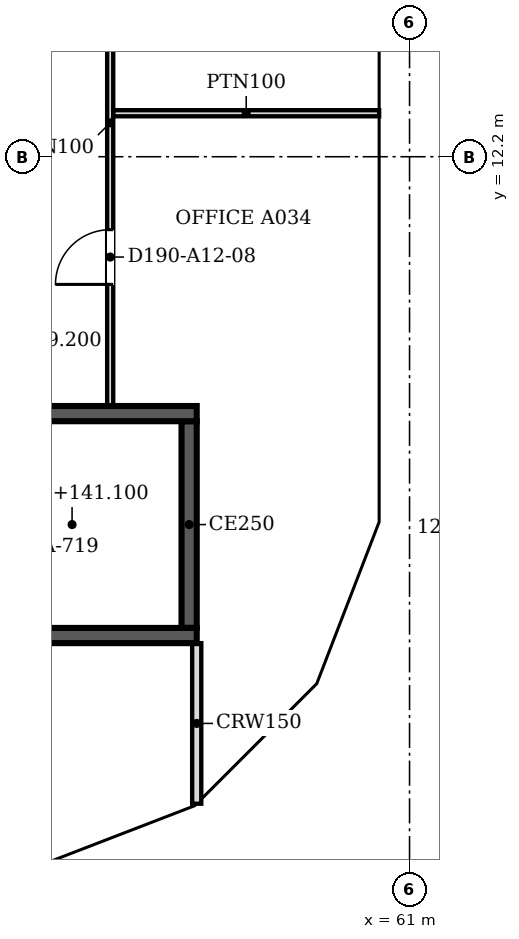
"""IFC4 building model, lengths in metres.
Left out: names, types, materials, properties, quantities, classifications, styles, units other than length and angle.
Written with IfcOpenShell. Run it as: python <this file> out.ifc"""

import sys

from ifc_helpers import new_model, si_unit, direction, frame, frame_2d, origin, place, context, subcontext, project, spatial, polyline, rectangle, outline, extrude, faceted_brep, source, transform, mapped, element, fill, save


model = new_model("IFC4")
c1 = context("Model", 3, precision=1e-05, world=origin(), true_north=direction((0.0, 1.0)))
c2 = subcontext(c1, "Body", "Model", "MODEL_VIEW")
j1 = project(units=[si_unit("LENGTHUNIT", "METRE"), si_unit("PLANEANGLEUNIT", "RADIAN")], contexts=[c1])
p1 = place(None, origin())
s1 = spatial("IfcSite", under=j1, at=p1, CompositionType="ELEMENT")
p2 = place(p1, origin())
s2 = spatial("IfcBuilding", under=s1, at=p2, CompositionType="ELEMENT")
p3 = place(p2, frame((0.0, 0.0, 139.2)))
s3 = spatial("IfcBuildingStorey", under=s2, at=p3, CompositionType="ELEMENT", Elevation=139.2)
m1 = source(origin(), c2, "Body", "Brep", [
    faceted_brep([(2.95, -0.25, 0.0), (3.003, -0.25, 0.068), (3.003, -0.25, 7.532), (2.95, -0.25, 7.6), (0.0, -0.25, 3.8), (0.047, 0.25, 3.86), (2.898, 0.25, 7.532), (2.898, 0.25, 0.068), (0.047, 0.25, 3.74), (2.95, 0.0, 0.0), (2.95, 0.0, 7.6), (0.0, 0.0, 3.8)], [[[0, 1, 2, 3, 4]], [[5, 6, 7, 8]], [[1, 0, 9]], [[10, 3, 2]], [[6, 5, 11, 4, 3, 10]], [[8, 7, 9, 0, 4, 11]], [[8, 11, 5]], [[1, 9, 7, 6, 10, 2]]]),
])
p4 = place(p3, frame((54.854, 0.25, -3.8), z_axis=(0.0, 0.0, 1.0), x_axis=(0.932970071518, 0.359953949349, 0.0)))
e1 = element("IfcWall", 1, at=p4, inside=s3, PredefinedType="SOLIDWALL", context=c2, shape_type="MappedRepresentation", body=[
    mapped(m1, transform((0.0, 0.0, 0.0), scale=1.0)),
])
m2 = source(origin(), c2, "Body", "SweptSolid", [
    extrude(outline(polyline([(2.75, 6.935), (0.316, 3.8), (2.75, 0.665), (2.75, 6.935)])), frame((0.0, 0.26, 0.0), z_axis=(0.0, -1.0, 0.0), x_axis=(1.0, 0.0, 0.0)), (0.0, 0.0, 1.0), 0.52),
])
p5 = place(p4, origin())
e2 = element("IfcOpeningElement", 2, at=p5, cuts=e1, PredefinedType="OPENING", context=c2, shape_type="MappedRepresentation", body=[
    mapped(m2, transform((0.0, 0.0, 0.0), scale=1.0)),
])
m3 = source(origin(), c2, "Body", "Brep", [
    faceted_brep([(0.053, -0.25, 0.0), (2.997, -0.25, 3.8), (0.053, -0.25, 7.6), (0.0, -0.25, 7.532), (0.0, -0.25, 0.068), (0.106, 0.25, 7.532), (2.944, 0.25, 3.868), (2.944, 0.25, 3.732), (0.106, 0.25, 0.068), (2.997, 0.0, 3.8), (0.053, 0.0, 0.0), (0.053, 0.0, 7.6)], [[[0, 1, 2, 3, 4]], [[5, 6, 7, 8]], [[8, 7, 9, 1, 0, 10]], [[6, 5, 11, 2, 1, 9]], [[3, 2, 11]], [[10, 0, 4]], [[8, 10, 4, 3, 11, 5]], [[9, 7, 6]]]),
])
p6 = place(p3, frame((57.569, 1.274, -3.8), z_axis=(0.0, 0.0, 1.0), x_axis=(0.707066050402, 0.707147509625, 0.0)))
e3 = element("IfcWall", 3, at=p6, inside=s3, PredefinedType="SOLIDWALL", context=c2, shape_type="MappedRepresentation", body=[
    mapped(m3, transform((0.0, 0.0, 0.0), scale=1.0)),
])
m4 = source(origin(), c2, "Body", "SweptSolid", [
    extrude(outline(polyline([(0.253, 0.667), (2.681, 3.8), (0.253, 6.934), (0.253, 0.667)])), frame((0.0, 0.26, 0.0), z_axis=(0.0, -1.0, 0.0), x_axis=(1.0, 0.0, 0.0)), (0.0, 0.0, 1.0), 0.52),
])
p7 = place(p6, origin())
e4 = element("IfcOpeningElement", 4, at=p7, cuts=e3, PredefinedType="OPENING", context=c2, shape_type="MappedRepresentation", body=[
    mapped(m4, transform((0.0, 0.0, 0.0), scale=1.0)),
])
m5 = source(origin(), c2, "Body", "Brep", [
    faceted_brep([(2.95, -0.25, 0.0), (2.997, -0.25, 0.059), (2.997, -0.25, 7.541), (2.95, -0.25, 7.6), (0.0, -0.25, 3.8), (0.053, 0.25, 3.868), (2.904, 0.25, 7.54), (2.904, 0.25, 0.06), (0.053, 0.25, 3.732), (2.95, 0.0, 0.0), (2.95, 0.0, 7.6), (0.0, 0.0, 3.8)], [[[0, 1, 2, 3, 4]], [[5, 6, 7, 8]], [[1, 0, 9]], [[10, 3, 2]], [[6, 5, 11, 4, 3, 10]], [[8, 7, 9, 0, 4, 11]], [[8, 11, 5]], [[1, 9, 7, 6, 10, 2]]]),
])
p8 = place(p3, frame((59.688, 3.394, -3.8), z_axis=(0.0, 0.0, 1.0), x_axis=(0.359972353723, 0.932962970624, 0.0)))
e5 = element("IfcWall", 5, at=p8, inside=s3, PredefinedType="SOLIDWALL", context=c2, shape_type="MappedRepresentation", body=[
    mapped(m5, transform((0.0, 0.0, 0.0), scale=1.0)),
])
p9 = place(p8, origin())
e6 = element("IfcOpeningElement", 6, at=p9, cuts=e5, PredefinedType="OPENING", context=c2, shape_type="MappedRepresentation", body=[
    mapped(m2, transform((0.0, 0.0, 0.0), scale=1.0)),
])
m6 = source(origin(), c2, "Body", "Brep", [
    faceted_brep([(0.047, -0.25, 0.0), (3.05, -0.25, 3.8), (0.047, -0.25, 7.6), (0.0, -0.25, 7.54), (0.0, -0.25, 0.06), (0.093, 0.25, 7.541), (3.05, 0.25, 3.8), (0.093, 0.25, 0.059), (0.047, 0.0, 0.0), (0.047, 0.0, 7.6)], [[[0, 1, 2, 3, 4]], [[5, 6, 7]], [[7, 6, 1, 0, 8]], [[6, 5, 9, 2, 1]], [[3, 2, 9]], [[8, 0, 4]], [[7, 8, 4, 3, 9, 5]]]),
])
p10 = place(p3, frame((60.75, 6.1, -3.8), z_axis=(0.0, 0.0, 1.0), x_axis=(0.0, 1.0, 0.0)))
e7 = element("IfcWall", 7, at=p10, inside=s3, PredefinedType="SOLIDWALL", context=c2, shape_type="MappedRepresentation", body=[
    mapped(m6, transform((0.0, 0.0, 0.0), scale=1.0)),
])
m7 = source(origin(), c2, "Body", "SweptSolid", [
    extrude(outline(polyline([(0.247, 0.656), (2.731, 3.8), (0.247, 6.944), (0.247, 0.656)])), frame((0.0, 0.26, 0.0), z_axis=(0.0, -1.0, 0.0), x_axis=(1.0, 0.0, 0.0)), (0.0, 0.0, 1.0), 0.52),
])
p11 = place(p10, origin())
e8 = element("IfcOpeningElement", 8, at=p11, cuts=e7, PredefinedType="OPENING", context=c2, shape_type="MappedRepresentation", body=[
    mapped(m7, transform((0.0, 0.0, 0.0), scale=1.0)),
])
m8 = source(origin(), c2, "Body", "SweptSolid", [
    extrude(outline(polyline([(3.05, 0.0), (6.1, 3.8), (3.05, 7.6), (0.0, 3.8), (3.05, 0.0)])), frame((0.0, 0.25, 0.0), z_axis=(0.0, -1.0, 0.0), x_axis=(1.0, 0.0, 0.0)), (0.0, 0.0, 1.0), 0.5),
])
p12 = place(p3, frame((60.75, 9.15, -3.8), z_axis=(0.0, 0.0, 1.0), x_axis=(0.0, 1.0, 0.0)))
e9 = element("IfcWall", 9, at=p12, inside=s3, PredefinedType="SOLIDWALL", context=c2, shape_type="MappedRepresentation", body=[
    mapped(m8, transform((0.0, 0.0, 0.0), scale=1.0)),
])
m9 = source(origin(), c2, "Body", "SweptSolid", [
    extrude(outline(polyline([(3.05, 0.399), (5.78, 3.8), (3.05, 7.201), (0.321, 3.8), (3.05, 0.399)])), frame((0.0, 0.26, 0.0), z_axis=(0.0, -1.0, 0.0), x_axis=(1.0, 0.0, 0.0)), (0.0, 0.0, 1.0), 0.52),
])
p13 = place(p12, origin())
e10 = element("IfcOpeningElement", 10, at=p13, cuts=e9, PredefinedType="OPENING", context=c2, shape_type="MappedRepresentation", body=[
    mapped(m9, transform((0.0, 0.0, 0.0), scale=1.0)),
])
p14 = place(p2, frame((0.0, 0.0, 143.0)))
s4 = spatial("IfcBuildingStorey", under=s2, at=p14, CompositionType="ELEMENT", Elevation=143.0)
m10 = source(origin(), c2, "Body", "Brep", [
    faceted_brep([(0.047, -0.25, 0.0), (2.997, -0.25, 3.8), (0.047, -0.25, 7.6), (0.0, -0.25, 7.541), (0.0, -0.25, 0.059), (0.093, 0.25, 7.54), (2.944, 0.25, 3.868), (2.944, 0.25, 3.732), (0.093, 0.25, 0.06), (2.997, 0.0, 3.8), (0.047, 0.0, 0.0), (0.047, 0.0, 7.6)], [[[0, 1, 2, 3, 4]], [[5, 6, 7, 8]], [[8, 7, 9, 1, 0, 10]], [[6, 5, 11, 2, 1, 9]], [[3, 2, 11]], [[10, 0, 4]], [[8, 10, 4, 3, 11, 5]], [[9, 7, 6]]]),
])
p15 = place(p14, frame((54.81, 0.233, -3.8), z_axis=(0.0, 0.0, 1.0), x_axis=(0.932990326376, 0.359901446078, 0.0)))
e11 = element("IfcWall", 11, at=p15, inside=s4, PredefinedType="SOLIDWALL", context=c2, shape_type="MappedRepresentation", body=[
    mapped(m10, transform((0.0, 0.0, 0.0), scale=1.0)),
])
m11 = source(origin(), c2, "Body", "SweptSolid", [
    extrude(outline(polyline([(0.247, 0.665), (2.681, 3.8), (0.247, 6.935), (0.247, 0.665)])), frame((0.0, 0.26, 0.0), z_axis=(0.0, -1.0, 0.0), x_axis=(1.0, 0.0, 0.0)), (0.0, 0.0, 1.0), 0.52),
])
p16 = place(p15, origin())
e12 = element("IfcOpeningElement", 12, at=p16, cuts=e11, PredefinedType="OPENING", context=c2, shape_type="MappedRepresentation", body=[
    mapped(m11, transform((0.0, 0.0, 0.0), scale=1.0)),
])
m12 = source(origin(), c2, "Body", "Brep", [
    faceted_brep([(2.944, -0.25, 0.0), (2.997, -0.25, 0.068), (2.997, -0.25, 7.532), (2.944, -0.25, 7.6), (0.0, -0.25, 3.8), (0.053, 0.25, 3.868), (2.891, 0.25, 7.532), (2.891, 0.25, 0.068), (0.053, 0.25, 3.732), (2.944, 0.0, 0.0), (2.944, 0.0, 7.6), (0.0, 0.0, 3.8)], [[[0, 1, 2, 3, 4]], [[5, 6, 7, 8]], [[1, 0, 9]], [[10, 3, 2]], [[6, 5, 11, 4, 3, 10]], [[8, 7, 9, 0, 4, 11]], [[8, 11, 5]], [[1, 9, 7, 6, 10, 2]]]),
])
p17 = place(p14, frame((57.606, 1.312, -3.8), z_axis=(0.0, 0.0, 1.0), x_axis=(0.707147509625, 0.707066050402, 0.0)))
e13 = element("IfcWall", 13, at=p17, inside=s4, PredefinedType="SOLIDWALL", context=c2, shape_type="MappedRepresentation", body=[
    mapped(m12, transform((0.0, 0.0, 0.0), scale=1.0)),
])
m13 = source(origin(), c2, "Body", "SweptSolid", [
    extrude(outline(polyline([(2.744, 6.934), (0.316, 3.8), (2.744, 0.666), (2.744, 6.934)])), frame((0.0, 0.26, 0.0), z_axis=(0.0, -1.0, 0.0), x_axis=(1.0, 0.0, 0.0)), (0.0, 0.0, 1.0), 0.52),
])
p18 = place(p17, origin())
e14 = element("IfcOpeningElement", 14, at=p18, cuts=e13, PredefinedType="OPENING", context=c2, shape_type="MappedRepresentation", body=[
    mapped(m13, transform((0.0, 0.0, 0.0), scale=1.0)),
])
m14 = source(origin(), c2, "Body", "Brep", [
    faceted_brep([(0.053, -0.25, 0.0), (3.003, -0.25, 3.8), (0.053, -0.25, 7.6), (0.0, -0.25, 7.532), (0.0, -0.25, 0.068), (0.106, 0.25, 7.532), (2.957, 0.25, 3.86), (2.957, 0.25, 3.74), (0.106, 0.25, 0.068), (3.003, 0.0, 3.8), (0.053, 0.0, 0.0), (0.053, 0.0, 7.6)], [[[0, 1, 2, 3, 4]], [[5, 6, 7, 8]], [[8, 7, 9, 1, 0, 10]], [[6, 5, 11, 2, 1, 9]], [[3, 2, 11]], [[10, 0, 4]], [[8, 10, 4, 3, 11, 5]], [[9, 7, 6]]]),
])
p19 = place(p14, frame((59.669, 3.344, -3.8), z_axis=(0.0, 0.0, 1.0), x_axis=(0.35992665181, 0.932980602862, 0.0)))
e15 = element("IfcWall", 15, at=p19, inside=s4, PredefinedType="SOLIDWALL", context=c2, shape_type="MappedRepresentation", body=[
    mapped(m14, transform((0.0, 0.0, 0.0), scale=1.0)),
])
m15 = source(origin(), c2, "Body", "SweptSolid", [
    extrude(outline(polyline([(0.253, 0.665), (2.687, 3.8), (0.253, 6.935), (0.253, 0.665)])), frame((0.0, 0.26, 0.0), z_axis=(0.0, -1.0, 0.0), x_axis=(1.0, 0.0, 0.0)), (0.0, 0.0, 1.0), 0.52),
])
p20 = place(p19, origin())
e16 = element("IfcOpeningElement", 16, at=p20, cuts=e15, PredefinedType="OPENING", context=c2, shape_type="MappedRepresentation", body=[
    mapped(m15, transform((0.0, 0.0, 0.0), scale=1.0)),
])
m16 = source(origin(), c2, "Body", "Brep", [
    faceted_brep([(3.003, -0.25, 0.0), (6.053, -0.25, 3.8), (3.003, -0.25, 7.6), (0.0, -0.25, 3.8), (0.047, 0.25, 3.859), (3.003, 0.25, 7.6), (6.053, 0.25, 3.8), (3.003, 0.25, 0.0), (0.047, 0.25, 3.741), (0.0, 0.0, 3.8)], [[[0, 1, 2, 3]], [[4, 5, 6, 7, 8]], [[7, 6, 1, 0]], [[6, 5, 2, 1]], [[5, 4, 9, 3, 2]], [[8, 7, 0, 3, 9]], [[8, 9, 4]]]),
])
p21 = place(p14, frame((60.75, 6.146, -3.8), z_axis=(0.0, 0.0, 1.0), x_axis=(0.0, 1.0, 0.0)))
e17 = element("IfcWall", 17, at=p21, inside=s4, PredefinedType="SOLIDWALL", context=c2, shape_type="MappedRepresentation", body=[
    mapped(m16, transform((0.0, 0.0, 0.0), scale=1.0)),
])
m17 = source(origin(), c2, "Body", "SweptSolid", [
    extrude(outline(polyline([(3.005, 0.401), (5.733, 3.8), (3.005, 7.199), (0.319, 3.8), (3.005, 0.401)])), frame((0.0, 0.26, 0.0), z_axis=(0.0, -1.0, 0.0), x_axis=(1.0, 0.0, 0.0)), (0.0, 0.0, 1.0), 0.52),
])
p22 = place(p21, origin())
e18 = element("IfcOpeningElement", 18, at=p22, cuts=e17, PredefinedType="OPENING", context=c2, shape_type="MappedRepresentation", body=[
    mapped(m17, transform((0.0, 0.0, 0.0), scale=1.0)),
])
p23 = place(p14, frame((60.75, 12.2, -3.8), z_axis=(0.0, 0.0, 1.0), x_axis=(0.0, 1.0, 0.0)))
e19 = element("IfcWall", 19, at=p23, inside=s4, PredefinedType="SOLIDWALL", context=c2, shape_type="MappedRepresentation", body=[
    mapped(m8, transform((0.0, 0.0, 0.0), scale=1.0)),
])
p24 = place(p23, origin())
e20 = element("IfcOpeningElement", 20, at=p24, cuts=e19, PredefinedType="OPENING", context=c2, shape_type="MappedRepresentation", body=[
    mapped(m9, transform((0.0, 0.0, 0.0), scale=1.0)),
])
p25 = place(p3, frame((57.5, 4.325, 0.0), z_axis=(0.0, 0.0, 1.0), x_axis=(-1.0, 0.0, 0.0)))
e21 = element("IfcWall", 21, at=p25, inside=s3, PredefinedType="SOLIDWALL", context=c2, shape_type="SweptSolid", body=[
    extrude(rectangle(XDim=8.5, YDim=0.25, at=frame_2d((4.25, 0.0))), origin(), (0.0, 0.0, 1.0), 3.8),
])
m18 = source(origin(), c2, "Body", "SweptSolid", [
    extrude(rectangle(XDim=1.2, YDim=2.1, at=frame_2d((0.6, 1.05))), frame((0.0, 0.135, 0.0), z_axis=(0.0, -1.0, 0.0), x_axis=(1.0, 0.0, 0.0)), (0.0, 0.0, 1.0), 0.27),
])
p26 = place(p25, frame((6.9, 0.0, 0.0)))
e22 = element("IfcOpeningElement", 22, at=p26, cuts=e21, PredefinedType="OPENING", context=c2, shape_type="MappedRepresentation", body=[
    mapped(m18, transform((0.0, 0.0, 0.0), scale=1.0)),
])
p27 = place(p3, frame((49.0, 7.975, 0.0), z_axis=(0.0, 0.0, 1.0), x_axis=(1.0, 0.0, 0.0)))
e23 = element("IfcWall", 23, at=p27, inside=s3, PredefinedType="SOLIDWALL", context=c2, shape_type="SweptSolid", body=[
    extrude(rectangle(XDim=8.5, YDim=0.25, at=frame_2d((4.25, 0.0))), origin(), (0.0, 0.0, 1.0), 3.8),
])
p28 = place(p3, frame((57.375, 7.85, 0.0), z_axis=(0.0, 0.0, 1.0), x_axis=(0.0, -1.0, 0.0)))
e24 = element("IfcWall", 24, at=p28, inside=s3, PredefinedType="SOLIDWALL", context=c2, shape_type="SweptSolid", body=[
    extrude(rectangle(XDim=3.4, YDim=0.25, at=frame_2d((1.7, 0.0))), origin(), (0.0, 0.0, 1.0), 3.8),
])
p29 = place(p3, frame((57.5, 1.559, 0.0), z_axis=(0.0, 0.0, 1.0), x_axis=(0.0, 1.0, 0.0)))
e25 = element("IfcWall", 25, at=p29, inside=s3, PredefinedType="PARTITIONING", context=c2, shape_type="SweptSolid", body=[
    extrude(rectangle(XDim=2.641, YDim=0.15, at=frame_2d((1.32, 0.0))), origin(), (0.0, 0.0, 1.0), 3.067),
])
p30 = place(p3, frame((56.077, 17.024, 0.0), z_axis=(0.0, 0.0, 1.0), x_axis=(0.0, -1.0, 0.0)))
e26 = element("IfcWall", 26, at=p30, inside=s3, PredefinedType="PARTITIONING", context=c2, shape_type="SweptSolid", body=[
    extrude(rectangle(XDim=8.924, YDim=0.1, at=frame_2d((4.462, 0.0))), origin(), (0.0, 0.0, 1.0), 3.067),
])
m19 = source(origin(), c2, "Body", "SweptSolid", [
    extrude(rectangle(XDim=0.9, YDim=2.1, at=frame_2d((0.45, 1.05))), frame((0.0, 0.06, 0.0), z_axis=(0.0, -1.0, 0.0), x_axis=(1.0, 0.0, 0.0)), (0.0, 0.0, 1.0), 0.12),
])
p31 = place(p30, frame((1.608, 0.0, 0.0)))
e27 = element("IfcOpeningElement", 27, at=p31, cuts=e26, PredefinedType="OPENING", context=c2, shape_type="MappedRepresentation", body=[
    mapped(m19, transform((0.0, 0.0, 0.0), scale=1.0)),
])
p32 = place(p30, frame((6.024, 0.0, 0.0)))
e28 = element("IfcOpeningElement", 28, at=p32, cuts=e26, PredefinedType="OPENING", context=c2, shape_type="MappedRepresentation", body=[
    mapped(m19, transform((0.0, 0.0, 0.0), scale=1.0)),
])
p33 = place(p3, frame((56.128, 12.915, 0.0), z_axis=(0.0, 0.0, 1.0), x_axis=(1.0, 0.0, 0.0)))
e29 = element("IfcWall", 29, at=p33, inside=s3, PredefinedType="PARTITIONING", context=c2, shape_type="SweptSolid", body=[
    extrude(rectangle(XDim=4.372, YDim=0.1, at=frame_2d((2.186, 0.0))), origin(), (0.0, 0.0, 1.0), 3.067),
])
m20 = source(origin(), c2, "Body", "SweptSolid", [
    extrude(rectangle(XDim=0.9, YDim=2.1, at=frame_2d((0.45, 1.05))), frame((0.0, 0.025, 0.0), z_axis=(0.0, -1.0, 0.0), x_axis=(1.0, 0.0, 0.0)), (0.0, 0.0, 1.0), 0.05),
])
p34 = place(p32, origin())
e30 = element("IfcDoor", 30, at=p34, inside=s3, OperationType="SINGLE_SWING_RIGHT", PredefinedType="DOOR", context=c2, shape_type="MappedRepresentation", body=[
    mapped(m20, transform((0.0, 0.0, 0.0), scale=1.0)),
])
fill(e28, e30)
save(model, sys.argv[1])
